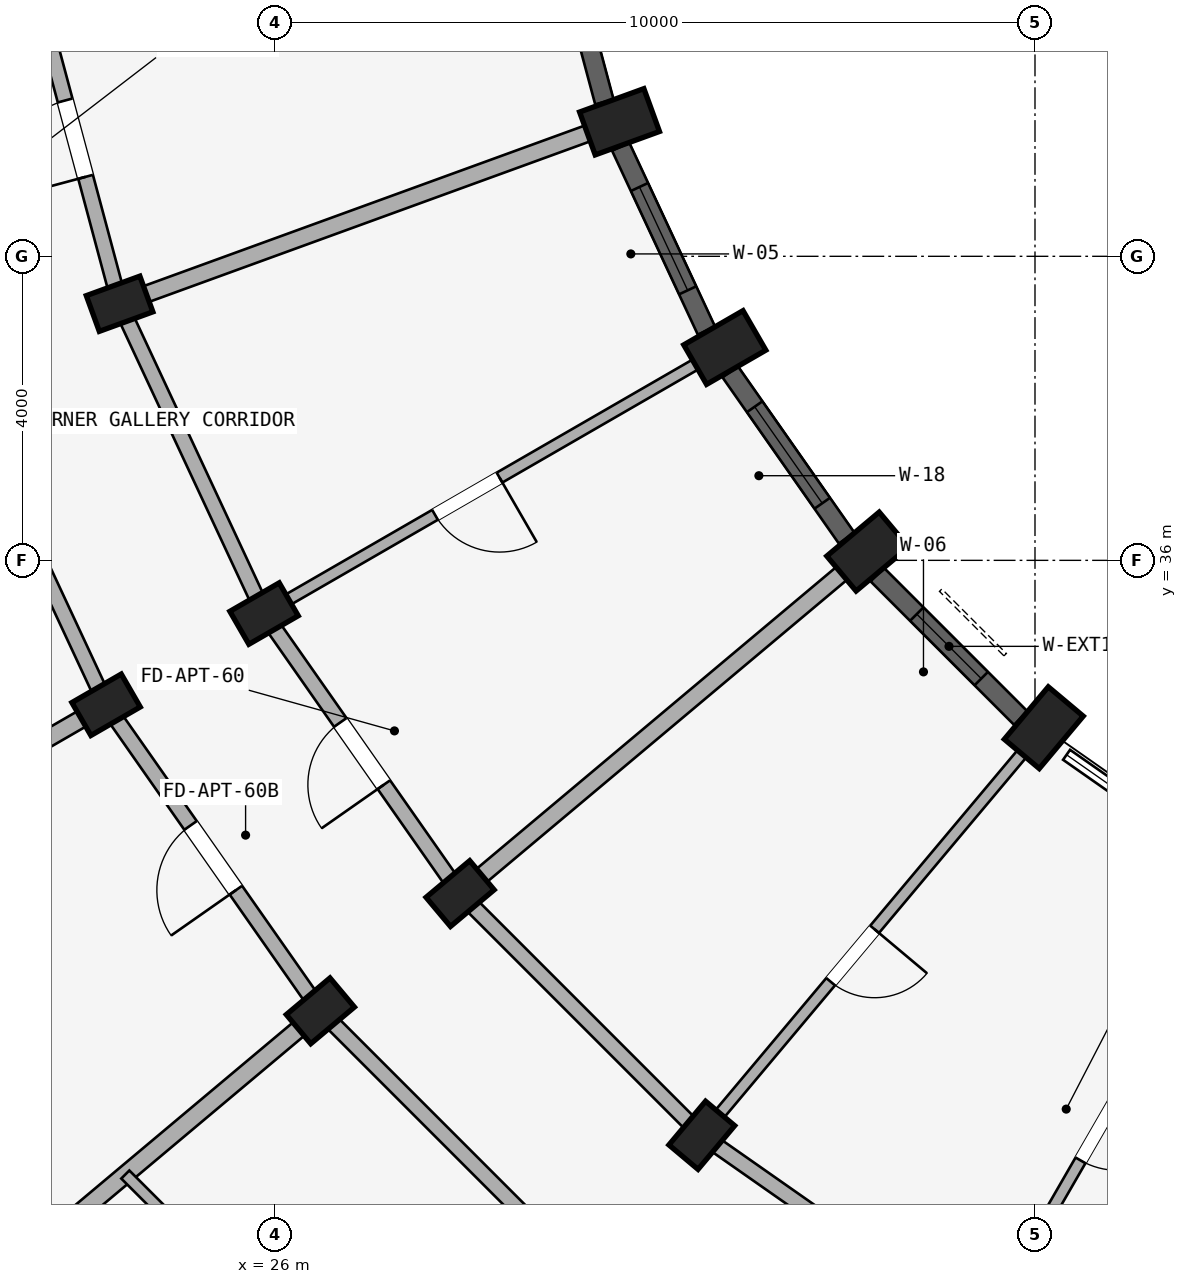
"""IFC4 building model, lengths in metres.
Left out: names, types, materials, properties, quantities, classifications, styles, units other than length and angle.
Written with IfcOpenShell. Run it as: python <this file> out.ifc"""

import sys

from ifc_helpers import new_model, si_unit, direction, frame, frame_2d, origin, origin_2d, place, context, subcontext, project, spatial, rectangle, extrude, element, fill, save


model = new_model("IFC4")
c1 = context("Model", 3, precision=1e-05, world=origin(), true_north=direction((0.0, 1.0)))
c2 = subcontext(c1, "Body", "Model", "MODEL_VIEW")
j1 = project(units=[si_unit("LENGTHUNIT", "METRE"), si_unit("PLANEANGLEUNIT", "RADIAN")], contexts=[c1])
p1 = place(None, origin())
s1 = spatial("IfcSite", under=j1, at=p1, CompositionType="ELEMENT")
p2 = place(p1, origin())
s2 = spatial("IfcBuilding", under=s1, at=p2, CompositionType="ELEMENT")
p3 = place(p2, frame((0.0, 0.0, 4.5)))
s3 = spatial("IfcBuildingStorey", under=s2, at=p3, CompositionType="ELEMENT", Elevation=4.5)
p4 = place(p3, frame((36.115, 33.798, 0.0), z_axis=(0.0, 0.0, 1.0), x_axis=(-0.766044443119, 0.642787609687, 0.0)))
e1 = element("IfcColumn", 1, at=p4, inside=s3, PredefinedType="COLUMN", context=c2, shape_type="SweptSolid", body=[
    extrude(rectangle(XDim=0.6, YDim=0.9, at=origin_2d()), origin(), (0.0, 0.0, 1.0), 3.98),
])
p5 = place(p3, frame((31.616, 28.436, 0.0), z_axis=(0.0, 0.0, 1.0), x_axis=(-0.766044443119, 0.642787609687, 0.0)))
e2 = element("IfcColumn", 2, at=p5, inside=s3, PredefinedType="COLUMN", context=c2, shape_type="SweptSolid", body=[
    extrude(rectangle(XDim=0.5, YDim=0.75, at=origin_2d()), origin(), (0.0, 0.0, 1.0), 3.98),
])
p6 = place(p3, frame((33.798, 36.115, 0.0), z_axis=(0.0, 0.0, 1.0), x_axis=(-0.642787609687, 0.766044443119, 0.0)))
e3 = element("IfcColumn", 3, at=p6, inside=s3, PredefinedType="COLUMN", context=c2, shape_type="SweptSolid", body=[
    extrude(rectangle(XDim=0.6, YDim=0.9, at=origin_2d()), origin(), (0.0, 0.0, 1.0), 3.98),
])
for number, where, z_axis, x_axis in (
    (4, (28.436, 31.616, 0.0), (0.0, 0.0, 1.0), (-0.643, 0.766, 0.0)),
    (5, (26.598, 30.073, 0.0), (0.0, 0.0, 1.0), (-0.643, 0.766, 0.0)),
):
    element("IfcColumn", number, at=place(p3, frame(where, z_axis=z_axis, x_axis=x_axis)), inside=s3, PredefinedType="COLUMN", context=c2, shape_type="SweptSolid", body=[
        extrude(rectangle(XDim=0.5, YDim=0.75, at=origin_2d()), origin(), (0.0, 0.0, 1.0), 3.98),
    ])
p7 = place(p3, frame((31.919, 38.8, 0.0), z_axis=(0.0, 0.0, 1.0), x_axis=(-0.5, 0.866025403784, 0.0)))
e6 = element("IfcColumn", 6, at=p7, inside=s3, PredefinedType="COLUMN", context=c2, shape_type="SweptSolid", body=[
    extrude(rectangle(XDim=0.6, YDim=0.9, at=origin_2d()), origin(), (0.0, 0.0, 1.0), 3.98),
])
for number, where, z_axis, x_axis in (
    (7, (25.856, 35.3, 0.0), (0.0, 0.0, 1.0), (-0.5, 0.866, 0.0)),
    (8, (23.778, 34.1, 0.0), (0.0, 0.0, 1.0), (-0.5, 0.866, 0.0)),
):
    element("IfcColumn", number, at=place(p3, frame(where, z_axis=z_axis, x_axis=x_axis)), inside=s3, PredefinedType="COLUMN", context=c2, shape_type="SweptSolid", body=[
        extrude(rectangle(XDim=0.5, YDim=0.75, at=origin_2d()), origin(), (0.0, 0.0, 1.0), 3.98),
    ])
p8 = place(p3, frame((30.534, 41.77, 0.0), z_axis=(0.0, 0.0, 1.0), x_axis=(-0.342020143326, 0.939692620786, 0.0)))
e9 = element("IfcColumn", 9, at=p8, inside=s3, PredefinedType="COLUMN", context=c2, shape_type="SweptSolid", body=[
    extrude(rectangle(XDim=0.6, YDim=0.9, at=origin_2d()), origin(), (0.0, 0.0, 1.0), 3.98),
])
p9 = place(p3, frame((23.956, 39.376, 0.0), z_axis=(0.0, 0.0, 1.0), x_axis=(-0.342020143326, 0.939692620786, 0.0)))
e10 = element("IfcColumn", 10, at=p9, inside=s3, PredefinedType="COLUMN", context=c2, shape_type="SweptSolid", body=[
    extrude(rectangle(XDim=0.5, YDim=0.75, at=origin_2d()), origin(), (0.0, 0.0, 1.0), 3.98),
])
p10 = place(p3, frame((35.3, 25.856, 0.0), z_axis=(0.0, 0.0, 1.0), x_axis=(-0.819155404658, 0.573571637217, 0.0)))
e11 = element("IfcWall", 11, at=p10, inside=s3, PredefinedType="STANDARD", context=c2, shape_type="SweptSolid", body=[
    extrude(rectangle(XDim=4.497, YDim=0.2, at=frame_2d((2.249, 0.0))), origin(), (0.0, 0.0, 1.0), 3.322),
])
p11 = place(p3, frame((31.616, 28.436, 0.0), z_axis=(0.0, 0.0, 1.0), x_axis=(-0.707106781187, 0.707106781187, 0.0)))
e12 = element("IfcWall", 12, at=p11, inside=s3, PredefinedType="STANDARD", context=c2, shape_type="SweptSolid", body=[
    extrude(rectangle(XDim=4.497, YDim=0.2, at=frame_2d((2.249, 0.0))), origin(), (0.0, 0.0, 1.0), 3.322),
])
p12 = place(p3, frame((30.073, 26.598, 0.0), z_axis=(0.0, 0.0, 1.0), x_axis=(-0.707106781187, 0.707106781187, 0.0)))
e13 = element("IfcWall", 13, at=p12, inside=s3, PredefinedType="STANDARD", context=c2, shape_type="SweptSolid", body=[
    extrude(rectangle(XDim=4.916, YDim=0.2, at=frame_2d((2.458, 0.0))), origin(), (0.0, 0.0, 1.0), 3.322),
])
p13 = place(p3, frame((28.436, 31.616, 0.0), z_axis=(0.0, 0.0, 1.0), x_axis=(-0.573571637217, 0.819155404658, 0.0)))
e14 = element("IfcWall", 14, at=p13, inside=s3, PredefinedType="STANDARD", context=c2, shape_type="SweptSolid", body=[
    extrude(rectangle(XDim=4.497, YDim=0.2, at=frame_2d((2.249, 0.0))), origin(), (0.0, 0.0, 1.0), 3.322),
])
p14 = place(p13, frame((1.749, 0.0, 0.0)))
e15 = element("IfcOpeningElement", 15, at=p14, cuts=e14, PredefinedType="OPENING", context=c2, shape_type="SweptSolid", body=[
    extrude(rectangle(XDim=1.0, YDim=2.15, at=frame_2d((0.5, 1.075))), frame((0.0, 0.11, 0.0), z_axis=(0.0, -1.0, 0.0), x_axis=(1.0, 0.0, 0.0)), (0.0, 0.0, 1.0), 0.22),
])
p15 = place(p3, frame((26.598, 30.073, 0.0), z_axis=(0.0, 0.0, 1.0), x_axis=(-0.573592335331, 0.819140911474, 0.0)))
e16 = element("IfcWall", 16, at=p15, inside=s3, PredefinedType="STANDARD", context=c2, shape_type="SweptSolid", body=[
    extrude(rectangle(XDim=4.916, YDim=0.2, at=frame_2d((2.458, 0.0))), origin(), (0.0, 0.0, 1.0), 3.322),
])
p16 = place(p15, frame((1.938, 0.0, 0.0)))
e17 = element("IfcOpeningElement", 17, at=p16, cuts=e16, PredefinedType="OPENING", context=c2, shape_type="SweptSolid", body=[
    extrude(rectangle(XDim=1.04, YDim=2.15, at=frame_2d((0.52, 1.075))), frame((0.0, 0.11, 0.0), z_axis=(0.0, -1.0, 0.0), x_axis=(1.0, 0.0, 0.0)), (0.0, 0.0, 1.0), 0.22),
])
p17 = place(p3, frame((25.856, 35.3, 0.0), z_axis=(0.0, 0.0, 1.0), x_axis=(-0.422617978463, 0.906307919131, 0.0)))
e18 = element("IfcWall", 18, at=p17, inside=s3, PredefinedType="STANDARD", context=c2, shape_type="SweptSolid", body=[
    extrude(rectangle(XDim=4.497, YDim=0.2, at=frame_2d((2.249, 0.0))), origin(), (0.0, 0.0, 1.0), 3.322),
])
p18 = place(p3, frame((23.778, 34.1, 0.0), z_axis=(0.0, 0.0, 1.0), x_axis=(-0.422629854778, 0.906302381024, 0.0)))
e19 = element("IfcWall", 19, at=p18, inside=s3, PredefinedType="STANDARD", context=c2, shape_type="SweptSolid", body=[
    extrude(rectangle(XDim=4.915, YDim=0.2, at=frame_2d((2.458, 0.0))), origin(), (0.0, 0.0, 1.0), 3.322),
])
p19 = place(p18, frame((1.918, 0.0, 0.0)))
e20 = element("IfcOpeningElement", 20, at=p19, cuts=e19, PredefinedType="OPENING", context=c2, shape_type="SweptSolid", body=[
    extrude(rectangle(XDim=1.08, YDim=2.15, at=frame_2d((0.54, 1.075))), frame((0.0, 0.11, 0.0), z_axis=(0.0, -1.0, 0.0), x_axis=(1.0, 0.0, 0.0)), (0.0, 0.0, 1.0), 0.22),
])
p20 = place(p3, frame((23.956, 39.376, 0.0), z_axis=(0.0, 0.0, 1.0), x_axis=(-0.258787642463, 0.965934240054, 0.0)))
e21 = element("IfcWall", 21, at=p20, inside=s3, PredefinedType="STANDARD", context=c2, shape_type="SweptSolid", body=[
    extrude(rectangle(XDim=4.497, YDim=0.2, at=frame_2d((2.249, 0.0))), origin(), (0.0, 0.0, 1.0), 3.322),
])
p21 = place(p20, frame((1.729, 0.0, 0.0)))
e22 = element("IfcOpeningElement", 22, at=p21, cuts=e21, PredefinedType="OPENING", context=c2, shape_type="SweptSolid", body=[
    extrude(rectangle(XDim=1.04, YDim=2.15, at=frame_2d((0.52, 1.075))), frame((0.0, 0.11, 0.0), z_axis=(0.0, -1.0, 0.0), x_axis=(1.0, 0.0, 0.0)), (0.0, 0.0, 1.0), 0.22),
])
p22 = place(p3, frame((38.7, 31.746, 0.0), z_axis=(0.0, 0.0, 1.0), x_axis=(-0.499997969693, -0.866026575979, 0.0)))
e23 = element("IfcWall", 23, at=p22, inside=s3, PredefinedType="PARTITIONING", context=c2, shape_type="SweptSolid", body=[
    extrude(rectangle(XDim=6.75, YDim=0.15, at=frame_2d((3.375, 0.0))), origin(), (0.0, 0.0, 1.0), 3.322),
])
p23 = place(p22, frame((3.222, 0.0, 0.0)))
e24 = element("IfcOpeningElement", 24, at=p23, cuts=e23, PredefinedType="OPENING", context=c2, shape_type="SweptSolid", body=[
    extrude(rectangle(XDim=0.98, YDim=2.12, at=frame_2d((0.49, 1.06))), frame((0.0, 0.085, 0.0), z_axis=(0.0, -1.0, 0.0), x_axis=(1.0, 0.0, 0.0)), (0.0, 0.0, 1.0), 0.17),
])
p24 = place(p3, frame((35.987, 33.645, 0.0), z_axis=(0.0, 0.0, 1.0), x_axis=(-0.642784846501, -0.766046761698, 0.0)))
e25 = element("IfcWall", 25, at=p24, inside=s3, PredefinedType="PARTITIONING", context=c2, shape_type="SweptSolid", body=[
    extrude(rectangle(XDim=6.75, YDim=0.15, at=frame_2d((3.375, 0.0))), origin(), (0.0, 0.0, 1.0), 3.322),
])
p25 = place(p24, frame((3.262, 0.0, 0.0)))
e26 = element("IfcOpeningElement", 26, at=p25, cuts=e25, PredefinedType="OPENING", context=c2, shape_type="SweptSolid", body=[
    extrude(rectangle(XDim=0.9, YDim=2.1, at=frame_2d((0.45, 1.05))), frame((0.0, 0.085, 0.0), z_axis=(0.0, -1.0, 0.0), x_axis=(1.0, 0.0, 0.0)), (0.0, 0.0, 1.0), 0.17),
])
p26 = place(p3, frame((33.645, 35.987, 0.0), z_axis=(0.0, 0.0, 1.0), x_axis=(-0.766046761698, -0.642784846501, 0.0)))
e27 = element("IfcWall", 27, at=p26, inside=s3, PredefinedType="STANDARD", context=c2, shape_type="SweptSolid", body=[
    extrude(rectangle(XDim=6.75, YDim=0.22, at=frame_2d((3.375, 0.0))), origin(), (0.0, 0.0, 1.0), 3.322),
])
p27 = place(p3, frame((26.521, 30.009, 0.0), z_axis=(0.0, 0.0, 1.0), x_axis=(-0.766046835987, -0.642784757967, 0.0)))
e28 = element("IfcWall", 28, at=p27, inside=s3, PredefinedType="STANDARD", context=c2, shape_type="SweptSolid", body=[
    extrude(rectangle(XDim=17.42, YDim=0.23, at=frame_2d((8.71, 0.0))), origin(), (0.0, 0.0, 1.0), 3.322),
])
p28 = place(p3, frame((31.746, 38.7, 0.0), z_axis=(0.0, 0.0, 1.0), x_axis=(-0.866026575979, -0.499997969693, 0.0)))
e29 = element("IfcWall", 29, at=p28, inside=s3, PredefinedType="PARTITIONING", context=c2, shape_type="SweptSolid", body=[
    extrude(rectangle(XDim=6.75, YDim=0.15, at=frame_2d((3.375, 0.0))), origin(), (0.0, 0.0, 1.0), 3.322),
])
p29 = place(p28, frame((3.222, 0.0, 0.0)))
e30 = element("IfcOpeningElement", 30, at=p29, cuts=e29, PredefinedType="OPENING", context=c2, shape_type="SweptSolid", body=[
    extrude(rectangle(XDim=0.98, YDim=2.12, at=frame_2d((0.49, 1.06))), frame((0.0, 0.085, 0.0), z_axis=(0.0, -1.0, 0.0), x_axis=(1.0, 0.0, 0.0)), (0.0, 0.0, 1.0), 0.17),
])
p30 = place(p3, frame((23.691, 34.05, 0.0), z_axis=(0.0, 0.0, 1.0), x_axis=(-0.866026648973, -0.499997843263, 0.0)))
e31 = element("IfcWall", 31, at=p30, inside=s3, PredefinedType="STANDARD", context=c2, shape_type="SweptSolid", body=[
    extrude(rectangle(XDim=17.42, YDim=0.23, at=frame_2d((8.71, 0.0))), origin(), (0.0, 0.0, 1.0), 3.322),
])
p31 = place(p3, frame((30.346, 41.702, 0.0), z_axis=(0.0, 0.0, 1.0), x_axis=(-0.939696231917, -0.342010221662, 0.0)))
e32 = element("IfcWall", 32, at=p31, inside=s3, PredefinedType="STANDARD", context=c2, shape_type="SweptSolid", body=[
    extrude(rectangle(XDim=6.75, YDim=0.22, at=frame_2d((3.375, 0.0))), origin(), (0.0, 0.0, 1.0), 3.322),
])
p32 = place(p3, frame((27.92, 24.031, 0.0), z_axis=(0.0, 0.0, 1.0), x_axis=(-0.707106781187, 0.707106781187, 0.0)))
e33 = element("IfcWall", 33, at=p32, inside=s3, PredefinedType="PLUMBINGWALL", context=c2, shape_type="SweptSolid", body=[
    extrude(rectangle(XDim=5.5, YDim=0.15, at=frame_2d((2.75, 0.0))), origin(), (0.0, 0.0, 1.0), 3.322),
])
p33 = place(p32, frame((2.37, 0.0, 0.0)))
e34 = element("IfcOpeningElement", 34, at=p33, cuts=e33, PredefinedType="OPENING", context=c2, shape_type="SweptSolid", body=[
    extrude(rectangle(XDim=0.76, YDim=2.05, at=frame_2d((0.38, 1.025))), frame((0.0, 0.085, 0.0), z_axis=(0.0, -1.0, 0.0), x_axis=(1.0, 0.0, 0.0)), (0.0, 0.0, 1.0), 0.17),
])
p34 = place(p3, frame((35.812, 33.925, 0.0), z_axis=(0.0, 0.0, 1.0), x_axis=(-0.707106781187, 0.707106781187, 0.0)))
e35 = element("IfcWall", 35, at=p34, inside=s3, PredefinedType="STANDARD", context=c2, shape_type="SweptSolid", body=[
    extrude(rectangle(XDim=2.67, YDim=0.25, at=frame_2d((1.335, 0.0))), origin(), (0.0, 0.0, 1.0), 3.472),
])
p35 = place(p34, frame((0.735, 0.0, 0.88)))
e36 = element("IfcOpeningElement", 36, at=p35, cuts=e35, PredefinedType="OPENING", context=c2, shape_type="SweptSolid", body=[
    extrude(rectangle(XDim=1.2, YDim=1.5, at=frame_2d((0.6, 0.75))), frame((0.0, 0.135, 0.0), z_axis=(0.0, -1.0, 0.0), x_axis=(1.0, 0.0, 0.0)), (0.0, 0.0, 1.0), 0.27),
])
p36 = place(p3, frame((33.522, 36.293, 0.0), z_axis=(0.0, 0.0, 1.0), x_axis=(-0.573591230309, 0.819141685249, 0.0)))
e37 = element("IfcWall", 37, at=p36, inside=s3, PredefinedType="STANDARD", context=c2, shape_type="SweptSolid", body=[
    extrude(rectangle(XDim=2.67, YDim=0.25, at=frame_2d((1.335, 0.0))), origin(), (0.0, 0.0, 1.0), 3.472),
])
p37 = place(p36, frame((0.56, 0.0, 0.88)))
e38 = element("IfcOpeningElement", 38, at=p37, cuts=e37, PredefinedType="OPENING", context=c2, shape_type="SweptSolid", body=[
    extrude(rectangle(XDim=1.55, YDim=1.6, at=frame_2d((0.775, 0.8))), frame((0.0, 0.135, 0.0), z_axis=(0.0, -1.0, 0.0), x_axis=(1.0, 0.0, 0.0)), (0.0, 0.0, 1.0), 0.27),
])
p38 = place(p3, frame((31.677, 39.022, 0.0), z_axis=(0.0, 0.0, 1.0), x_axis=(-0.422610081738, 0.90631160139, 0.0)))
e39 = element("IfcWall", 39, at=p38, inside=s3, PredefinedType="STANDARD", context=c2, shape_type="SweptSolid", body=[
    extrude(rectangle(XDim=2.669, YDim=0.25, at=frame_2d((1.335, 0.0))), origin(), (0.0, 0.0, 1.0), 3.472),
])
p39 = place(p38, frame((0.585, 0.0, 0.88)))
e40 = element("IfcOpeningElement", 40, at=p39, cuts=e39, PredefinedType="OPENING", context=c2, shape_type="SweptSolid", body=[
    extrude(rectangle(XDim=1.5, YDim=1.65, at=frame_2d((0.75, 0.825))), frame((0.0, 0.135, 0.0), z_axis=(0.0, -1.0, 0.0), x_axis=(1.0, 0.0, 0.0)), (0.0, 0.0, 1.0), 0.27),
])
p40 = place(p3, frame((30.334, 42.031, 0.0), z_axis=(0.0, 0.0, 1.0), x_axis=(-0.258812272661, 0.965927640934, 0.0)))
e41 = element("IfcWall", 41, at=p40, inside=s3, PredefinedType="STANDARD", context=c2, shape_type="SweptSolid", body=[
    extrude(rectangle(XDim=2.67, YDim=0.25, at=frame_2d((1.335, 0.0))), origin(), (0.0, 0.0, 1.0), 3.472),
])
p41 = place(p40, frame((0.735, 0.0, 0.88)))
e42 = element("IfcOpeningElement", 42, at=p41, cuts=e41, PredefinedType="OPENING", context=c2, shape_type="SweptSolid", body=[
    extrude(rectangle(XDim=1.2, YDim=1.5, at=frame_2d((0.6, 0.75))), frame((0.0, 0.135, 0.0), z_axis=(0.0, -1.0, 0.0), x_axis=(1.0, 0.0, 0.0)), (0.0, 0.0, 1.0), 0.27),
])
p42 = place(p35, origin())
e43 = element("IfcWindow", 43, at=p42, inside=s3, PartitioningType="SINGLE_PANEL", PredefinedType="WINDOW", context=c2, shape_type="SweptSolid", body=[
    extrude(rectangle(XDim=1.2, YDim=1.5, at=frame_2d((0.6, 0.75))), frame((0.0, 0.03, 0.0), z_axis=(0.0, -1.0, 0.0), x_axis=(1.0, 0.0, 0.0)), (0.0, 0.0, 1.0), 0.06),
])
fill(e36, e43)
p43 = place(p37, origin())
e44 = element("IfcWindow", 44, at=p43, inside=s3, PartitioningType="DOUBLE_PANEL_VERTICAL", PredefinedType="WINDOW", context=c2, shape_type="SweptSolid", body=[
    extrude(rectangle(XDim=1.55, YDim=1.6, at=frame_2d((0.775, 0.8))), frame((0.0, 0.03, 0.0), z_axis=(0.0, -1.0, 0.0), x_axis=(1.0, 0.0, 0.0)), (0.0, 0.0, 1.0), 0.06),
])
fill(e38, e44)
p44 = place(p39, origin())
e45 = element("IfcWindow", 45, at=p44, inside=s3, PartitioningType="DOUBLE_PANEL_VERTICAL", PredefinedType="WINDOW", context=c2, shape_type="SweptSolid", body=[
    extrude(rectangle(XDim=1.5, YDim=1.65, at=frame_2d((0.75, 0.825))), frame((0.0, 0.03, 0.0), z_axis=(0.0, -1.0, 0.0), x_axis=(1.0, 0.0, 0.0)), (0.0, 0.0, 1.0), 0.06),
])
fill(e40, e45)
p45 = place(p23, origin())
e46 = element("IfcDoor", 46, at=p45, inside=s3, OperationType="SINGLE_SWING_LEFT", PredefinedType="DOOR", context=c2, shape_type="SweptSolid", body=[
    extrude(rectangle(XDim=0.98, YDim=2.12, at=frame_2d((0.49, 1.06))), frame((0.0, 0.025, 0.0), z_axis=(0.0, -1.0, 0.0), x_axis=(1.0, 0.0, 0.0)), (0.0, 0.0, 1.0), 0.05),
])
fill(e24, e46)
p46 = place(p25, origin())
e47 = element("IfcDoor", 47, at=p46, inside=s3, OperationType="SINGLE_SWING_LEFT", PredefinedType="DOOR", context=c2, shape_type="SweptSolid", body=[
    extrude(rectangle(XDim=0.9, YDim=2.1, at=frame_2d((0.45, 1.05))), frame((0.0, 0.025, 0.0), z_axis=(0.0, -1.0, 0.0), x_axis=(1.0, 0.0, 0.0)), (0.0, 0.0, 1.0), 0.05),
])
fill(e26, e47)
p47 = place(p29, origin())
e48 = element("IfcDoor", 48, at=p47, inside=s3, OperationType="SINGLE_SWING_LEFT", PredefinedType="DOOR", context=c2, shape_type="SweptSolid", body=[
    extrude(rectangle(XDim=0.98, YDim=2.12, at=frame_2d((0.49, 1.06))), frame((0.0, 0.025, 0.0), z_axis=(0.0, -1.0, 0.0), x_axis=(1.0, 0.0, 0.0)), (0.0, 0.0, 1.0), 0.05),
])
fill(e30, e48)
p48 = place(p16, origin())
e49 = element("IfcDoor", 49, at=p48, inside=s3, OperationType="SINGLE_SWING_LEFT", PredefinedType="DOOR", context=c2, shape_type="SweptSolid", body=[
    extrude(rectangle(XDim=1.04, YDim=2.15, at=frame_2d((0.52, 1.075))), frame((0.0, 0.025, 0.0), z_axis=(0.0, -1.0, 0.0), x_axis=(1.0, 0.0, 0.0)), (0.0, 0.0, 1.0), 0.05),
])
fill(e17, e49)
p49 = place(p14, origin())
e50 = element("IfcDoor", 50, at=p49, inside=s3, OperationType="SINGLE_SWING_LEFT", PredefinedType="DOOR", context=c2, shape_type="SweptSolid", body=[
    extrude(rectangle(XDim=1.0, YDim=2.15, at=frame_2d((0.5, 1.075))), frame((0.0, 0.025, 0.0), z_axis=(0.0, -1.0, 0.0), x_axis=(1.0, 0.0, 0.0)), (0.0, 0.0, 1.0), 0.05),
])
fill(e15, e50)
p50 = place(p21, frame((1.04, 0.0, 0.0), z_axis=(0.0, 0.0, 1.0), x_axis=(-1.0, 0.0, 0.0)))
e51 = element("IfcDoor", 51, at=p50, inside=s3, OperationType="SINGLE_SWING_RIGHT", PredefinedType="DOOR", context=c2, shape_type="SweptSolid", body=[
    extrude(rectangle(XDim=1.04, YDim=2.15, at=frame_2d((0.52, 1.075))), frame((0.0, 0.025, 0.0), z_axis=(0.0, -1.0, 0.0), x_axis=(1.0, 0.0, 0.0)), (0.0, 0.0, 1.0), 0.05),
])
fill(e22, e51)
save(model, sys.argv[1])
